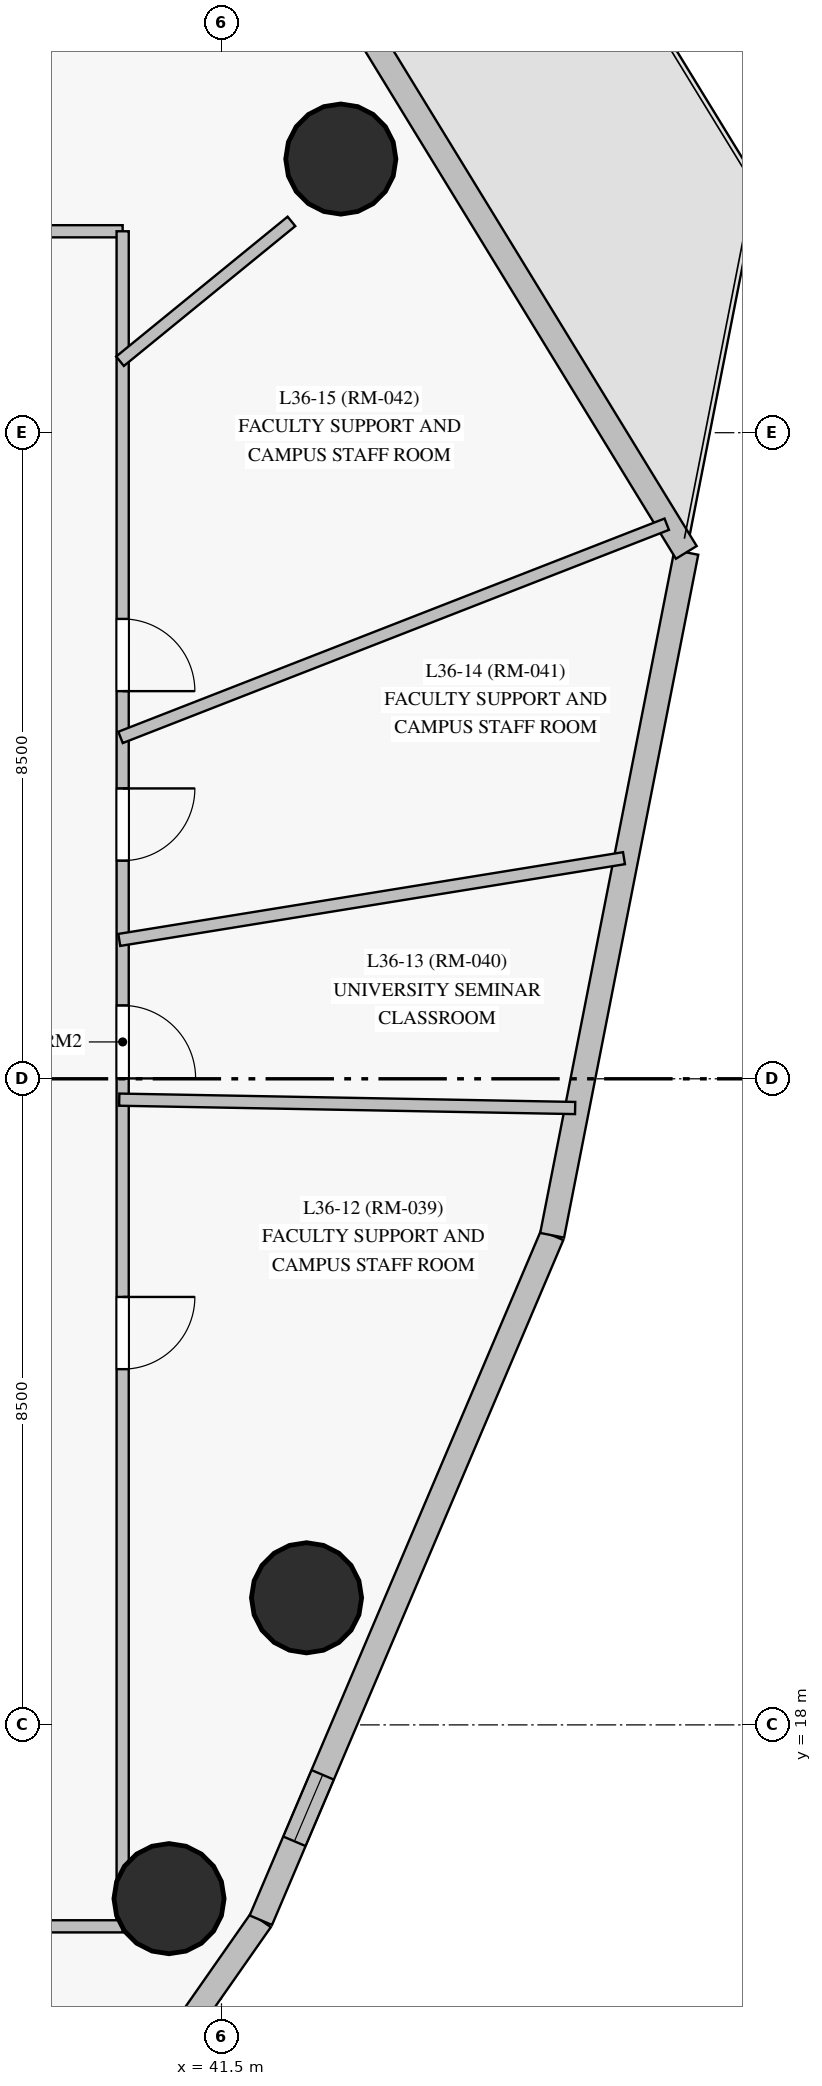
"""IFC4 building model, lengths in metres.
Left out: names, types, materials, properties, quantities, classifications, styles, units other than length and angle.
Written with IfcOpenShell. Run it as: python <this file> out.ifc"""

import sys

from ifc_helpers import new_model, si_unit, direction, frame, frame_2d, origin, origin_with_axes, origin_2d, place, context, subcontext, project, spatial, rectangle, circle, extrude, source, transform, mapped, element, fill, save


model = new_model("IFC4")
c1 = context("Model", 3, precision=1e-05, world=origin(), true_north=direction((0.0, 1.0)))
c2 = subcontext(c1, "Body", "Model", "MODEL_VIEW")
j1 = project(units=[si_unit("LENGTHUNIT", "METRE"), si_unit("PLANEANGLEUNIT", "RADIAN")], contexts=[c1])
p1 = place(None, origin())
s1 = spatial("IfcSite", under=j1, at=p1, CompositionType="ELEMENT")
p2 = place(p1, origin())
s2 = spatial("IfcBuilding", under=s1, at=p2, CompositionType="ELEMENT")
p3 = place(p2, frame((0.0, 0.0, 129.75)))
s3 = spatial("IfcBuildingStorey", under=s2, at=p3, CompositionType="ELEMENT", Elevation=129.75)
m1 = source(origin_with_axes(), c2, "Body", "SweptSolid", [
    extrude(circle(Radius=0.725, at=origin_2d()), origin(), (0.0, 0.0, 1.0), 3.05),
])
for number, where, z_axis, x_axis in (
    (1, (42.619, 19.672, 0.0), (0.0, 0.0, 1.0), (1.0, 0.0, 0.0)),
    (2, (43.07, 38.6, 0.0), (0.0, 0.0, 1.0), (1.0, 0.0, 0.0)),
    (3, (40.81, 15.714, 0.0), (0.0, 0.0, 1.0), (1.0, 0.0, 0.0)),
):
    element("IfcColumn", number, at=place(p3, frame(where, z_axis=z_axis, x_axis=x_axis)), inside=s3, PredefinedType="COLUMN", context=c2, shape_type="MappedRepresentation", body=[
        mapped(m1, transform((0.0, 0.0, 0.0), scale=1.0)),
    ])
p4 = place(p3, frame((33.945, 3.886, 0.0), z_axis=(0.0, 0.0, 1.0), x_axis=(0.573079618635, 0.819499695366, 0.0)))
e4 = element("IfcWall", 4, at=p4, inside=s3, PredefinedType="SOLIDWALL", context=c2, shape_type="SweptSolid", body=[
    extrude(rectangle(XDim=14.087, YDim=0.32, at=frame_2d((7.044, 0.0))), origin(), (0.0, 0.0, 1.0), 2.825),
])
p5 = place(p4, frame((0.824, 0.0, 0.85)))
e5 = element("IfcOpeningElement", 5, at=p5, cuts=e4, PredefinedType="OPENING", context=c2, shape_type="SweptSolid", body=[
    extrude(rectangle(XDim=1.65, YDim=1.65, at=frame_2d((0.825, 0.825))), frame((0.0, 0.17, 0.0), z_axis=(0.0, -1.0, 0.0), x_axis=(1.0, 0.0, 0.0)), (0.0, 0.0, 1.0), 0.34),
])
p6 = place(p4, frame((3.988, 0.0, 0.85)))
e6 = element("IfcOpeningElement", 6, at=p6, cuts=e4, PredefinedType="OPENING", context=c2, shape_type="SweptSolid", body=[
    extrude(rectangle(XDim=1.65, YDim=1.65, at=frame_2d((0.825, 0.825))), frame((0.0, 0.17, 0.0), z_axis=(0.0, -1.0, 0.0), x_axis=(1.0, 0.0, 0.0)), (0.0, 0.0, 1.0), 0.34),
])
p7 = place(p4, frame((8.827, 0.0, 0.85)))
e7 = element("IfcOpeningElement", 7, at=p7, cuts=e4, PredefinedType="OPENING", context=c2, shape_type="SweptSolid", body=[
    extrude(rectangle(XDim=1.65, YDim=1.65, at=frame_2d((0.825, 0.825))), frame((0.0, 0.17, 0.0), z_axis=(0.0, -1.0, 0.0), x_axis=(1.0, 0.0, 0.0)), (0.0, 0.0, 1.0), 0.34),
])
p8 = place(p3, frame((42.018, 15.431, 0.0), z_axis=(0.0, 0.0, 1.0), x_axis=(0.391384023763, 0.920227442507, 0.0)))
e8 = element("IfcWall", 8, at=p8, inside=s3, PredefinedType="SOLIDWALL", context=c2, shape_type="SweptSolid", body=[
    extrude(rectangle(XDim=9.792, YDim=0.32, at=frame_2d((4.896, 0.0))), origin(), (0.0, 0.0, 1.0), 2.825),
])
p9 = place(p8, frame((1.128, 0.0, 0.85)))
e9 = element("IfcOpeningElement", 9, at=p9, cuts=e8, PredefinedType="OPENING", context=c2, shape_type="SweptSolid", body=[
    extrude(rectangle(XDim=0.95, YDim=1.5, at=frame_2d((0.475, 0.75))), frame((0.0, 0.17, 0.0), z_axis=(0.0, -1.0, 0.0), x_axis=(1.0, 0.0, 0.0)), (0.0, 0.0, 1.0), 0.34),
])
p10 = place(p3, frame((45.85, 24.441, 0.0), z_axis=(0.0, 0.0, 1.0), x_axis=(0.192787024516, 0.981240624505, 0.0)))
e10 = element("IfcWall", 10, at=p10, inside=s3, PredefinedType="SOLIDWALL", context=c2, shape_type="SweptSolid", body=[
    extrude(rectangle(XDim=9.156, YDim=0.32, at=frame_2d((4.578, 0.0))), origin(), (0.0, 0.0, 1.0), 2.825),
])
p11 = place(p3, frame((47.615, 33.425, 0.0), z_axis=(0.0, 0.0, 1.0), x_axis=(-0.522110980626, 0.852877555051, 0.0)))
e11 = element("IfcWall", 11, at=p11, inside=s3, PredefinedType="SOLIDWALL", context=c2, shape_type="SweptSolid", body=[
    extrude(rectangle(XDim=16.819, YDim=0.32, at=frame_2d((8.41, 0.0))), origin(), (0.0, 0.0, 1.0), 2.495),
])
p12 = place(p11, frame((11.388, 0.0, 0.0)))
e12 = element("IfcOpeningElement", 12, at=p12, cuts=e11, PredefinedType="OPENING", context=c2, shape_type="SweptSolid", body=[
    extrude(rectangle(XDim=1.05, YDim=2.12, at=frame_2d((0.525, 1.06))), frame((0.0, 0.17, 0.0), z_axis=(0.0, -1.0, 0.0), x_axis=(1.0, 0.0, 0.0)), (0.0, 0.0, 1.0), 0.34),
])
p13 = place(p3, frame((16.7, 37.65, 0.0), z_axis=(0.0, 0.0, 1.0), x_axis=(1.0, 0.0, 0.0)))
e13 = element("IfcWall", 13, at=p13, inside=s3, PredefinedType="PARTITIONING", context=c2, shape_type="SweptSolid", body=[
    extrude(rectangle(XDim=23.5, YDim=0.16, at=frame_2d((11.75, 0.0))), origin(), (0.0, 0.0, 1.0), 2.325),
])
p14 = place(p13, frame((20.465, 0.0, 0.0)))
e14 = element("IfcOpeningElement", 14, at=p14, cuts=e13, PredefinedType="OPENING", context=c2, shape_type="SweptSolid", body=[
    extrude(rectangle(XDim=0.96, YDim=2.15, at=frame_2d((0.48, 1.075))), frame((0.0, 0.09, 0.0), z_axis=(0.0, -1.0, 0.0), x_axis=(1.0, 0.0, 0.0)), (0.0, 0.0, 1.0), 0.18),
])
p15 = place(p13, frame((17.06, 0.0, 0.0)))
e15 = element("IfcOpeningElement", 15, at=p15, cuts=e13, PredefinedType="OPENING", context=c2, shape_type="SweptSolid", body=[
    extrude(rectangle(XDim=0.95, YDim=2.15, at=frame_2d((0.475, 1.075))), frame((0.0, 0.09, 0.0), z_axis=(0.0, -1.0, 0.0), x_axis=(1.0, 0.0, 0.0)), (0.0, 0.0, 1.0), 0.18),
])
p16 = place(p13, frame((14.71, 0.0, 0.0)))
e16 = element("IfcOpeningElement", 16, at=p16, cuts=e13, PredefinedType="OPENING", context=c2, shape_type="SweptSolid", body=[
    extrude(rectangle(XDim=0.96, YDim=2.15, at=frame_2d((0.48, 1.075))), frame((0.0, 0.09, 0.0), z_axis=(0.0, -1.0, 0.0), x_axis=(1.0, 0.0, 0.0)), (0.0, 0.0, 1.0), 0.18),
])
p17 = place(p13, frame((10.785, 0.0, 0.0)))
e17 = element("IfcOpeningElement", 17, at=p17, cuts=e13, PredefinedType="OPENING", context=c2, shape_type="SweptSolid", body=[
    extrude(rectangle(XDim=0.95, YDim=2.15, at=frame_2d((0.475, 1.075))), frame((0.0, 0.09, 0.0), z_axis=(0.0, -1.0, 0.0), x_axis=(1.0, 0.0, 0.0)), (0.0, 0.0, 1.0), 0.18),
])
p18 = place(p13, frame((7.75, 0.0, 0.0)))
e18 = element("IfcOpeningElement", 18, at=p18, cuts=e13, PredefinedType="OPENING", context=c2, shape_type="SweptSolid", body=[
    extrude(rectangle(XDim=0.95, YDim=2.15, at=frame_2d((0.475, 1.075))), frame((0.0, 0.09, 0.0), z_axis=(0.0, -1.0, 0.0), x_axis=(1.0, 0.0, 0.0)), (0.0, 0.0, 1.0), 0.18),
])
p19 = place(p13, frame((6.195, 0.0, 0.0)))
e19 = element("IfcOpeningElement", 19, at=p19, cuts=e13, PredefinedType="OPENING", context=c2, shape_type="SweptSolid", body=[
    extrude(rectangle(XDim=0.86, YDim=2.1, at=frame_2d((0.43, 1.05))), frame((0.0, 0.09, 0.0), z_axis=(0.0, -1.0, 0.0), x_axis=(1.0, 0.0, 0.0)), (0.0, 0.0, 1.0), 0.18),
])
p20 = place(p3, frame((40.2, 37.65, 0.0), z_axis=(0.0, 0.0, 1.0), x_axis=(0.0, -1.0, 0.0)))
e20 = element("IfcWall", 20, at=p20, inside=s3, PredefinedType="PARTITIONING", context=c2, shape_type="SweptSolid", body=[
    extrude(rectangle(XDim=22.3, YDim=0.16, at=frame_2d((11.15, 0.0))), origin(), (0.0, 0.0, 1.0), 2.325),
])
p21 = place(p20, frame((14.02, 0.0, 0.0)))
e21 = element("IfcOpeningElement", 21, at=p21, cuts=e20, PredefinedType="OPENING", context=c2, shape_type="SweptSolid", body=[
    extrude(rectangle(XDim=0.95, YDim=2.15, at=frame_2d((0.475, 1.075))), frame((0.0, 0.09, 0.0), z_axis=(0.0, -1.0, 0.0), x_axis=(1.0, 0.0, 0.0)), (0.0, 0.0, 1.0), 0.18),
])
p22 = place(p20, frame((10.185, 0.0, 0.0)))
e22 = element("IfcOpeningElement", 22, at=p22, cuts=e20, PredefinedType="OPENING", context=c2, shape_type="SweptSolid", body=[
    extrude(rectangle(XDim=0.96, YDim=2.15, at=frame_2d((0.48, 1.075))), frame((0.0, 0.09, 0.0), z_axis=(0.0, -1.0, 0.0), x_axis=(1.0, 0.0, 0.0)), (0.0, 0.0, 1.0), 0.18),
])
p23 = place(p20, frame((7.33, 0.0, 0.0)))
e23 = element("IfcOpeningElement", 23, at=p23, cuts=e20, PredefinedType="OPENING", context=c2, shape_type="SweptSolid", body=[
    extrude(rectangle(XDim=0.95, YDim=2.15, at=frame_2d((0.475, 1.075))), frame((0.0, 0.09, 0.0), z_axis=(0.0, -1.0, 0.0), x_axis=(1.0, 0.0, 0.0)), (0.0, 0.0, 1.0), 0.18),
])
p24 = place(p20, frame((5.1, 0.0, 0.0)))
e24 = element("IfcOpeningElement", 24, at=p24, cuts=e20, PredefinedType="OPENING", context=c2, shape_type="SweptSolid", body=[
    extrude(rectangle(XDim=0.95, YDim=2.15, at=frame_2d((0.475, 1.075))), frame((0.0, 0.09, 0.0), z_axis=(0.0, -1.0, 0.0), x_axis=(1.0, 0.0, 0.0)), (0.0, 0.0, 1.0), 0.18),
])
p25 = place(p3, frame((40.2, 15.35, 0.0), z_axis=(0.0, 0.0, 1.0), x_axis=(-1.0, 0.0, 0.0)))
e25 = element("IfcWall", 25, at=p25, inside=s3, PredefinedType="PARTITIONING", context=c2, shape_type="SweptSolid", body=[
    extrude(rectangle(XDim=10.65, YDim=0.16, at=frame_2d((5.325, 0.0))), origin(), (0.0, 0.0, 1.0), 2.225),
])
p26 = place(p25, frame((7.952, 0.0, 0.0)))
e26 = element("IfcOpeningElement", 26, at=p26, cuts=e25, PredefinedType="OPENING", context=c2, shape_type="SweptSolid", body=[
    extrude(rectangle(XDim=0.95, YDim=2.15, at=frame_2d((0.475, 1.075))), frame((0.0, 0.09, 0.0), z_axis=(0.0, -1.0, 0.0), x_axis=(1.0, 0.0, 0.0)), (0.0, 0.0, 1.0), 0.18),
])
p27 = place(p25, frame((6.357, 0.0, 0.0)))
e27 = element("IfcOpeningElement", 27, at=p27, cuts=e25, PredefinedType="OPENING", context=c2, shape_type="SweptSolid", body=[
    extrude(rectangle(XDim=0.96, YDim=2.15, at=frame_2d((0.48, 1.075))), frame((0.0, 0.09, 0.0), z_axis=(0.0, -1.0, 0.0), x_axis=(1.0, 0.0, 0.0)), (0.0, 0.0, 1.0), 0.18),
])
p28 = place(p25, frame((4.46, 0.0, 0.0)))
e28 = element("IfcOpeningElement", 28, at=p28, cuts=e25, PredefinedType="OPENING", context=c2, shape_type="SweptSolid", body=[
    extrude(rectangle(XDim=0.95, YDim=2.15, at=frame_2d((0.475, 1.075))), frame((0.0, 0.09, 0.0), z_axis=(0.0, -1.0, 0.0), x_axis=(1.0, 0.0, 0.0)), (0.0, 0.0, 1.0), 0.18),
])
p29 = place(p3, frame((34.938, 37.624, 0.0), z_axis=(0.0, 0.0, 1.0), x_axis=(0.496885166333, 0.867816300537, 0.0)))
e29 = element("IfcWall", 29, at=p29, inside=s3, PredefinedType="PARTITIONING", context=c2, shape_type="SweptSolid", body=[
    extrude(rectangle(XDim=9.792, YDim=0.16, at=frame_2d((4.896, 0.0))), origin(), (0.0, 0.0, 1.0), 2.825),
])
p30 = place(p3, frame((40.172, 30.991, 0.0), z_axis=(0.0, 0.0, 1.0), x_axis=(0.931556703076, 0.363596079399, 0.0)))
e30 = element("IfcWall", 30, at=p30, inside=s3, PredefinedType="PARTITIONING", context=c2, shape_type="SweptSolid", body=[
    extrude(rectangle(XDim=7.714, YDim=0.16, at=frame_2d((3.857, 0.0))), origin(), (0.0, 0.0, 1.0), 2.825),
])
p31 = place(p3, frame((40.156, 28.327, 0.0), z_axis=(0.0, 0.0, 1.0), x_axis=(0.987136922494, 0.159877128597, 0.0)))
e31 = element("IfcWall", 31, at=p31, inside=s3, PredefinedType="PARTITIONING", context=c2, shape_type="SweptSolid", body=[
    extrude(rectangle(XDim=6.727, YDim=0.16, at=frame_2d((3.363, 0.0))), origin(), (0.0, 0.0, 1.0), 2.825),
])
p32 = place(p3, frame((40.155, 26.226, 0.0), z_axis=(0.0, 0.0, 1.0), x_axis=(0.999831535235, -0.018354867195, 0.0)))
e32 = element("IfcWall", 32, at=p32, inside=s3, PredefinedType="PARTITIONING", context=c2, shape_type="SweptSolid", body=[
    extrude(rectangle(XDim=5.999, YDim=0.16, at=frame_2d((3.0, 0.0))), origin(), (0.0, 0.0, 1.0), 2.825),
])
p33 = place(p3, frame((40.165, 35.94, 0.0), z_axis=(0.0, 0.0, 1.0), x_axis=(0.774801226036, 0.632204919415, 0.0)))
e33 = element("IfcWall", 33, at=p33, inside=s3, PredefinedType="PARTITIONING", context=c2, shape_type="SweptSolid", body=[
    extrude(rectangle(XDim=2.911, YDim=0.16, at=frame_2d((1.455, 0.0))), origin(), (0.0, 0.0, 1.0), 2.225),
])
m2 = source(origin_with_axes(), c2, "Body", "SweptSolid", [
    extrude(rectangle(XDim=0.95, YDim=1.5, at=frame_2d((0.475, 0.75))), frame((0.0, 0.03, 0.0), z_axis=(0.0, -1.0, 0.0), x_axis=(1.0, 0.0, 0.0)), (0.0, 0.0, 1.0), 0.06),
])
p34 = place(p9, origin())
e34 = element("IfcWindow", 34, at=p34, inside=s3, PartitioningType="SINGLE_PANEL", PredefinedType="WINDOW", context=c2, shape_type="MappedRepresentation", body=[
    mapped(m2, transform((0.0, 0.0, 0.0), scale=1.0)),
])
fill(e9, e34)
m3 = source(origin_with_axes(), c2, "Body", "SweptSolid", [
    extrude(rectangle(XDim=0.95, YDim=2.15, at=frame_2d((0.475, 1.075))), frame((0.0, 0.025, 0.0), z_axis=(0.0, -1.0, 0.0), x_axis=(1.0, 0.0, 0.0)), (0.0, 0.0, 1.0), 0.05),
])
p35 = place(p21, origin())
e35 = element("IfcDoor", 35, at=p35, inside=s3, OperationType="SINGLE_SWING_LEFT", PredefinedType="DOOR", context=c2, shape_type="MappedRepresentation", body=[
    mapped(m3, transform((0.0, 0.0, 0.0), scale=1.0)),
])
fill(e21, e35)
m4 = source(origin_with_axes(), c2, "Body", "SweptSolid", [
    extrude(rectangle(XDim=0.96, YDim=2.15, at=frame_2d((0.48, 1.075))), frame((0.0, 0.025, 0.0), z_axis=(0.0, -1.0, 0.0), x_axis=(1.0, 0.0, 0.0)), (0.0, 0.0, 1.0), 0.05),
])
p36 = place(p22, origin())
e36 = element("IfcDoor", 36, at=p36, inside=s3, OperationType="SINGLE_SWING_RIGHT", PredefinedType="DOOR", context=c2, shape_type="MappedRepresentation", body=[
    mapped(m4, transform((0.0, 0.0, 0.0), scale=1.0)),
])
fill(e22, e36)
p37 = place(p23, origin())
e37 = element("IfcDoor", 37, at=p37, inside=s3, OperationType="SINGLE_SWING_LEFT", PredefinedType="DOOR", context=c2, shape_type="MappedRepresentation", body=[
    mapped(m3, transform((0.0, 0.0, 0.0), scale=1.0)),
])
fill(e23, e37)
p38 = place(p24, origin())
e38 = element("IfcDoor", 38, at=p38, inside=s3, OperationType="SINGLE_SWING_RIGHT", PredefinedType="DOOR", context=c2, shape_type="MappedRepresentation", body=[
    mapped(m3, transform((0.0, 0.0, 0.0), scale=1.0)),
])
fill(e24, e38)
save(model, sys.argv[1])
